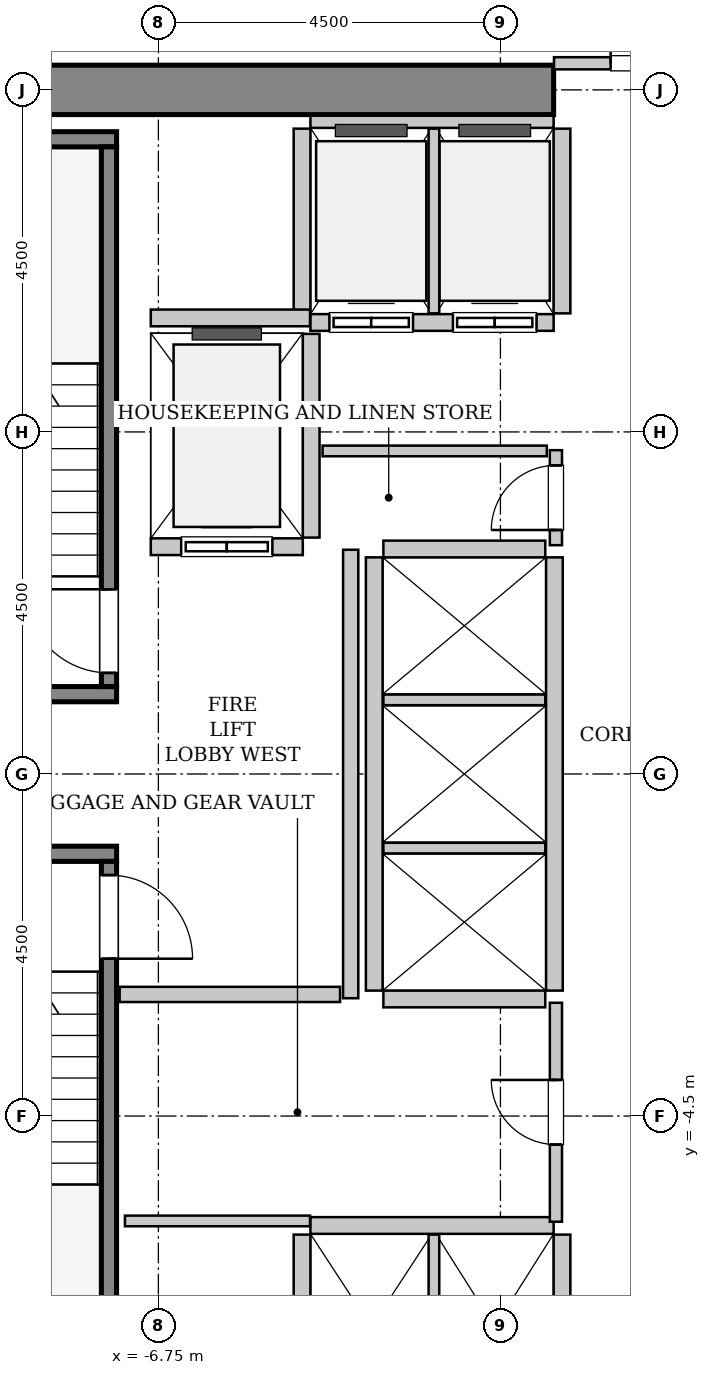
"""IFC4 building model, lengths in metres.
Left out: names, types, materials, properties, quantities, classifications, styles, units other than length and angle.
Written with IfcOpenShell. Run it as: python <this file> out.ifc"""

import sys

from ifc_helpers import new_model, si_unit, direction, frame, frame_2d, origin, place, context, subcontext, project, spatial, rectangle, extrude, source, transform, mapped, element, fill, save


model = new_model("IFC4")
c1 = context("Model", 3, precision=1e-05, world=origin(), true_north=direction((0.0, 1.0)))
c2 = subcontext(c1, "Body", "Model", "MODEL_VIEW")
j1 = project(units=[si_unit("LENGTHUNIT", "METRE"), si_unit("PLANEANGLEUNIT", "RADIAN")], contexts=[c1])
p1 = place(None, origin())
s1 = spatial("IfcSite", under=j1, at=p1, CompositionType="ELEMENT")
p2 = place(p1, origin())
s2 = spatial("IfcBuilding", under=s1, at=p2, CompositionType="ELEMENT")
p3 = place(p2, frame((0.0, 0.0, 48.2)))
s3 = spatial("IfcBuildingStorey", under=s2, at=p3, CompositionType="ELEMENT", Elevation=48.2)
m1 = source(origin(), c2, "Body", "SweptSolid", [
    extrude(rectangle(XDim=10.025, YDim=0.65, at=frame_2d((5.012, 0.0))), origin(), (0.0, 0.0, 1.0), 3.8),
])
p4 = place(p3, frame((-11.575, 9.0, 0.0), z_axis=(0.0, 0.0, 1.0), x_axis=(1.0, 0.0, 0.0)))
e1 = element("IfcWall", 1, at=p4, inside=s3, PredefinedType="SHEAR", context=c2, shape_type="MappedRepresentation", body=[
    mapped(m1, transform((0.0, 0.0, 0.0), x_axis=(1.0, 0.0, 0.0), y_axis=(0.0, 1.0, 0.0), z_axis=(0.0, 0.0, 1.0), scale=1.0)),
])
m2 = source(origin(), c2, "Body", "SweptSolid", [
    extrude(rectangle(XDim=3.4, YDim=0.2, at=frame_2d((1.7, 0.0))), origin(), (0.0, 0.0, 1.0), 3.8),
])
p5 = place(p3, frame((-7.3, 1.05, 0.0), z_axis=(0.0, 0.0, 1.0), x_axis=(-1.0, 0.0, 0.0)))
e2 = element("IfcWall", 2, at=p5, inside=s3, PredefinedType="SOLIDWALL", context=c2, shape_type="MappedRepresentation", body=[
    mapped(m2, transform((0.0, 0.0, 0.0), x_axis=(1.0, 0.0, 0.0), y_axis=(0.0, 1.0, 0.0), z_axis=(0.0, 0.0, 1.0), scale=1.0)),
])
m3 = source(origin(), c2, "Body", "SweptSolid", [
    extrude(rectangle(XDim=3.63, YDim=0.2, at=frame_2d((1.815, 0.0))), origin(), (0.0, 0.0, 1.0), 3.8),
])
p6 = place(p3, frame((-7.3, 8.35, 0.0), z_axis=(0.0, 0.0, 1.0), x_axis=(-1.0, 0.0, 0.0)))
e3 = element("IfcWall", 3, at=p6, inside=s3, PredefinedType="SOLIDWALL", context=c2, shape_type="MappedRepresentation", body=[
    mapped(m3, transform((0.0, 0.0, 0.0), x_axis=(1.0, 0.0, 0.0), y_axis=(0.0, 1.0, 0.0), z_axis=(0.0, 0.0, 1.0), scale=1.0)),
])
m4 = source(origin(), c2, "Body", "SweptSolid", [
    extrude(rectangle(XDim=7.1, YDim=0.2, at=frame_2d((3.55, 0.0))), origin(), (0.0, 0.0, 1.0), 3.8),
])
p7 = place(p3, frame((-7.4, 1.15, 0.0), z_axis=(0.0, 0.0, 1.0), x_axis=(0.0, 1.0, 0.0)))
e4 = element("IfcWall", 4, at=p7, inside=s3, PredefinedType="SOLIDWALL", context=c2, shape_type="MappedRepresentation", body=[
    mapped(m4, transform((0.0, 0.0, 0.0), x_axis=(1.0, 0.0, 0.0), y_axis=(0.0, 1.0, 0.0), z_axis=(0.0, 0.0, 1.0), scale=1.0)),
])
p8 = place(p7, frame((0.18, 0.0, 0.0)))
e5 = element("IfcOpeningElement", 5, at=p8, cuts=e4, PredefinedType="OPENING", context=c2, shape_type="SweptSolid", body=[
    extrude(rectangle(XDim=1.1, YDim=2.15, at=frame_2d((0.55, 1.075))), frame((0.0, 0.11, 0.0), z_axis=(0.0, -1.0, 0.0), x_axis=(1.0, 0.0, 0.0)), (0.0, 0.0, 1.0), 0.22),
])
p9 = place(p3, frame((-10.7, -1.05, 0.0), z_axis=(0.0, 0.0, 1.0), x_axis=(1.0, 0.0, 0.0)))
e6 = element("IfcWall", 6, at=p9, inside=s3, PredefinedType="SOLIDWALL", context=c2, shape_type="MappedRepresentation", body=[
    mapped(m2, transform((0.0, 0.0, 0.0), x_axis=(1.0, 0.0, 0.0), y_axis=(0.0, 1.0, 0.0), z_axis=(0.0, 0.0, 1.0), scale=1.0)),
])
p10 = place(p3, frame((-7.4, -1.15, 0.0), z_axis=(0.0, 0.0, 1.0), x_axis=(0.0, -1.0, 0.0)))
e7 = element("IfcWall", 7, at=p10, inside=s3, PredefinedType="SOLIDWALL", context=c2, shape_type="MappedRepresentation", body=[
    mapped(m4, transform((0.0, 0.0, 0.0), x_axis=(1.0, 0.0, 0.0), y_axis=(0.0, 1.0, 0.0), z_axis=(0.0, 0.0, 1.0), scale=1.0)),
])
p11 = place(p10, frame((0.18, 0.0, 0.0)))
e8 = element("IfcOpeningElement", 8, at=p11, cuts=e7, PredefinedType="OPENING", context=c2, shape_type="SweptSolid", body=[
    extrude(rectangle(XDim=1.1, YDim=2.15, at=frame_2d((0.55, 1.075))), frame((0.0, 0.11, 0.0), z_axis=(0.0, -1.0, 0.0), x_axis=(1.0, 0.0, 0.0)), (0.0, 0.0, 1.0), 0.22),
])
m5 = source(origin(), c2, "Body", "SweptSolid", [
    extrude(rectangle(XDim=2.0, YDim=0.22, at=frame_2d((1.0, 0.0))), origin(), (0.0, 0.0, 1.0), 3.535),
])
p12 = place(p3, frame((-6.85, 2.99, 0.0), z_axis=(0.0, 0.0, 1.0), x_axis=(1.0, 0.0, 0.0)))
e9 = element("IfcWall", 9, at=p12, inside=s3, PredefinedType="SOLIDWALL", context=c2, shape_type="MappedRepresentation", body=[
    mapped(m5, transform((0.0, 0.0, 0.0), x_axis=(1.0, 0.0, 0.0), y_axis=(0.0, 1.0, 0.0), z_axis=(0.0, 0.0, 1.0), scale=1.0)),
])
p13 = place(p12, frame((0.4, 0.0, 0.0)))
e10 = element("IfcOpeningElement", 10, at=p13, cuts=e9, PredefinedType="OPENING", context=c2, shape_type="SweptSolid", body=[
    extrude(rectangle(XDim=1.2, YDim=2.2, at=frame_2d((0.6, 1.1))), frame((0.0, 0.12, 0.0), z_axis=(0.0, -1.0, 0.0), x_axis=(1.0, 0.0, 0.0)), (0.0, 0.0, 1.0), 0.24),
])
m6 = source(origin(), c2, "Body", "SweptSolid", [
    extrude(rectangle(XDim=2.68, YDim=0.22, at=frame_2d((1.34, 0.0))), origin(), (0.0, 0.0, 1.0), 3.535),
])
p14 = place(p3, frame((-4.74, 3.11, 0.0), z_axis=(0.0, 0.0, 1.0), x_axis=(0.0, 1.0, 0.0)))
e11 = element("IfcWall", 11, at=p14, inside=s3, PredefinedType="SOLIDWALL", context=c2, shape_type="MappedRepresentation", body=[
    mapped(m6, transform((0.0, 0.0, 0.0), x_axis=(1.0, 0.0, 0.0), y_axis=(0.0, 1.0, 0.0), z_axis=(0.0, 0.0, 1.0), scale=1.0)),
])
m7 = source(origin(), c2, "Body", "SweptSolid", [
    extrude(rectangle(XDim=3.2, YDim=0.22, at=frame_2d((1.6, 0.0))), origin(), (0.0, 0.0, 1.0), 3.535),
])
p15 = place(p3, frame((-4.75, 5.94, 0.0), z_axis=(0.0, 0.0, 1.0), x_axis=(1.0, 0.0, 0.0)))
e12 = element("IfcWall", 12, at=p15, inside=s3, PredefinedType="SOLIDWALL", context=c2, shape_type="MappedRepresentation", body=[
    mapped(m7, transform((0.0, 0.0, 0.0), x_axis=(1.0, 0.0, 0.0), y_axis=(0.0, 1.0, 0.0), z_axis=(0.0, 0.0, 1.0), scale=1.0)),
])
p16 = place(p15, frame((0.25, 0.0, 0.0)))
e13 = element("IfcOpeningElement", 13, at=p16, cuts=e12, PredefinedType="OPENING", context=c2, shape_type="SweptSolid", body=[
    extrude(rectangle(XDim=1.1, YDim=2.2, at=frame_2d((0.55, 1.1))), frame((0.0, 0.12, 0.0), z_axis=(0.0, -1.0, 0.0), x_axis=(1.0, 0.0, 0.0)), (0.0, 0.0, 1.0), 0.24),
])
p17 = place(p15, frame((1.875, 0.0, 0.0)))
e14 = element("IfcOpeningElement", 14, at=p17, cuts=e12, PredefinedType="OPENING", context=c2, shape_type="SweptSolid", body=[
    extrude(rectangle(XDim=1.1, YDim=2.2, at=frame_2d((0.55, 1.1))), frame((0.0, 0.12, 0.0), z_axis=(0.0, -1.0, 0.0), x_axis=(1.0, 0.0, 0.0)), (0.0, 0.0, 1.0), 0.24),
])
m8 = source(origin(), c2, "Body", "SweptSolid", [
    extrude(rectangle(XDim=3.2, YDim=0.16, at=frame_2d((1.6, 0.0))), origin(), (0.0, 0.0, 1.0), 2.425),
])
p18 = place(p3, frame((-1.55, 8.58, 0.0), z_axis=(0.0, 0.0, 1.0), x_axis=(-1.0, 0.0, 0.0)))
e15 = element("IfcWall", 15, at=p18, inside=s3, PredefinedType="PARTITIONING", context=c2, shape_type="MappedRepresentation", body=[
    mapped(m8, transform((0.0, 0.0, 0.0), x_axis=(1.0, 0.0, 0.0), y_axis=(0.0, 1.0, 0.0), z_axis=(0.0, 0.0, 1.0), scale=1.0)),
])
m9 = source(origin(), c2, "Body", "SweptSolid", [
    extrude(rectangle(XDim=2.43, YDim=0.22, at=frame_2d((1.215, 0.0))), origin(), (0.0, 0.0, 1.0), 3.535),
])
p19 = place(p3, frame((-4.86, 8.49, 0.0), z_axis=(0.0, 0.0, 1.0), x_axis=(0.0, -1.0, 0.0)))
e16 = element("IfcWall", 16, at=p19, inside=s3, PredefinedType="SOLIDWALL", context=c2, shape_type="MappedRepresentation", body=[
    mapped(m9, transform((0.0, 0.0, 0.0), x_axis=(1.0, 0.0, 0.0), y_axis=(0.0, 1.0, 0.0), z_axis=(0.0, 0.0, 1.0), scale=1.0)),
])
m10 = source(origin(), c2, "Body", "SweptSolid", [
    extrude(rectangle(XDim=2.43, YDim=0.14, at=frame_2d((1.215, 0.0))), origin(), (0.0, 0.0, 1.0), 3.535),
])
p20 = place(p3, frame((-3.125, 6.06, 0.0), z_axis=(0.0, 0.0, 1.0), x_axis=(0.0, 1.0, 0.0)))
e17 = element("IfcWall", 17, at=p20, inside=s3, PredefinedType="PARTITIONING", context=c2, shape_type="MappedRepresentation", body=[
    mapped(m10, transform((0.0, 0.0, 0.0), x_axis=(1.0, 0.0, 0.0), y_axis=(0.0, 1.0, 0.0), z_axis=(0.0, 0.0, 1.0), scale=1.0)),
])
p21 = place(p3, frame((-1.44, 6.06, 0.0), z_axis=(0.0, 0.0, 1.0), x_axis=(0.0, 1.0, 0.0)))
e18 = element("IfcWall", 18, at=p21, inside=s3, PredefinedType="SOLIDWALL", context=c2, shape_type="MappedRepresentation", body=[
    mapped(m9, transform((0.0, 0.0, 0.0), x_axis=(1.0, 0.0, 0.0), y_axis=(0.0, 1.0, 0.0), z_axis=(0.0, 0.0, 1.0), scale=1.0)),
])
p22 = place(p3, frame((-1.55, -5.94, 0.0), z_axis=(0.0, 0.0, 1.0), x_axis=(-1.0, 0.0, 0.0)))
e19 = element("IfcWall", 19, at=p22, inside=s3, PredefinedType="SOLIDWALL", context=c2, shape_type="MappedRepresentation", body=[
    mapped(m7, transform((0.0, 0.0, 0.0), x_axis=(1.0, 0.0, 0.0), y_axis=(0.0, 1.0, 0.0), z_axis=(0.0, 0.0, 1.0), scale=1.0)),
])
p23 = place(p3, frame((-4.86, -6.06, 0.0), z_axis=(0.0, 0.0, 1.0), x_axis=(0.0, -1.0, 0.0)))
e20 = element("IfcWall", 20, at=p23, inside=s3, PredefinedType="SOLIDWALL", context=c2, shape_type="MappedRepresentation", body=[
    mapped(m9, transform((0.0, 0.0, 0.0), x_axis=(1.0, 0.0, 0.0), y_axis=(0.0, 1.0, 0.0), z_axis=(0.0, 0.0, 1.0), scale=1.0)),
])
p24 = place(p3, frame((-3.125, -8.49, 0.0), z_axis=(0.0, 0.0, 1.0), x_axis=(0.0, 1.0, 0.0)))
e21 = element("IfcWall", 21, at=p24, inside=s3, PredefinedType="PARTITIONING", context=c2, shape_type="MappedRepresentation", body=[
    mapped(m10, transform((0.0, 0.0, 0.0), x_axis=(1.0, 0.0, 0.0), y_axis=(0.0, 1.0, 0.0), z_axis=(0.0, 0.0, 1.0), scale=1.0)),
])
p25 = place(p3, frame((-1.44, -8.49, 0.0), z_axis=(0.0, 0.0, 1.0), x_axis=(0.0, 1.0, 0.0)))
e22 = element("IfcWall", 22, at=p25, inside=s3, PredefinedType="SOLIDWALL", context=c2, shape_type="MappedRepresentation", body=[
    mapped(m9, transform((0.0, 0.0, 0.0), x_axis=(1.0, 0.0, 0.0), y_axis=(0.0, 1.0, 0.0), z_axis=(0.0, 0.0, 1.0), scale=1.0)),
])
m11 = source(origin(), c2, "Body", "SweptSolid", [
    extrude(rectangle(XDim=5.7, YDim=0.22, at=frame_2d((2.85, 0.0))), origin(), (0.0, 0.0, 1.0), 3.535),
])
for number, where, z_axis, x_axis in (
    (23, (-1.54, -2.85, 0.0), (0.0, 0.0, 1.0), (0.0, 1.0, 0.0)),
    (24, (-3.91, 2.85, 0.0), (0.0, 0.0, 1.0), (0.0, -1.0, 0.0)),
):
    element("IfcWall", number, at=place(p3, frame(where, z_axis=z_axis, x_axis=x_axis)), inside=s3, PredefinedType="SOLIDWALL", context=c2, shape_type="MappedRepresentation", body=[
        mapped(m11, transform((0.0, 0.0, 0.0), x_axis=(1.0, 0.0, 0.0), y_axis=(0.0, 1.0, 0.0), z_axis=(0.0, 0.0, 1.0), scale=1.0)),
    ])
m12 = source(origin(), c2, "Body", "SweptSolid", [
    extrude(rectangle(XDim=2.13, YDim=0.22, at=frame_2d((1.065, 0.0))), origin(), (0.0, 0.0, 1.0), 3.535),
])
p26 = place(p3, frame((-3.79, -2.96, 0.0), z_axis=(0.0, 0.0, 1.0), x_axis=(1.0, 0.0, 0.0)))
e25 = element("IfcWall", 25, at=p26, inside=s3, PredefinedType="SOLIDWALL", context=c2, shape_type="MappedRepresentation", body=[
    mapped(m12, transform((0.0, 0.0, 0.0), x_axis=(1.0, 0.0, 0.0), y_axis=(0.0, 1.0, 0.0), z_axis=(0.0, 0.0, 1.0), scale=1.0)),
])
m13 = source(origin(), c2, "Body", "SweptSolid", [
    extrude(rectangle(XDim=2.13, YDim=0.14, at=frame_2d((1.065, 0.0))), origin(), (0.0, 0.0, 1.0), 3.535),
])
for number, where, z_axis, x_axis in (
    (26, (-3.79, -0.975, 0.0), (0.0, 0.0, 1.0), (1.0, 0.0, 0.0)),
    (27, (-3.79, 0.975, 0.0), (0.0, 0.0, 1.0), (1.0, 0.0, 0.0)),
):
    element("IfcWall", number, at=place(p3, frame(where, z_axis=z_axis, x_axis=x_axis)), inside=s3, PredefinedType="PARTITIONING", context=c2, shape_type="MappedRepresentation", body=[
        mapped(m13, transform((0.0, 0.0, 0.0), x_axis=(1.0, 0.0, 0.0), y_axis=(0.0, 1.0, 0.0), z_axis=(0.0, 0.0, 1.0), scale=1.0)),
    ])
p27 = place(p3, frame((-1.66, 2.96, 0.0), z_axis=(0.0, 0.0, 1.0), x_axis=(-1.0, 0.0, 0.0)))
e28 = element("IfcWall", 28, at=p27, inside=s3, PredefinedType="SOLIDWALL", context=c2, shape_type="MappedRepresentation", body=[
    mapped(m12, transform((0.0, 0.0, 0.0), x_axis=(1.0, 0.0, 0.0), y_axis=(0.0, 1.0, 0.0), z_axis=(0.0, 0.0, 1.0), scale=1.0)),
])
m14 = source(origin(), c2, "Body", "SweptSolid", [
    extrude(rectangle(XDim=2.095, YDim=0.22, at=frame_2d((1.048, 0.0))), origin(), (0.0, 0.0, 1.0), 3.535),
])
p28 = place(p3, frame((-6.85, 6.0, 0.0), z_axis=(0.0, 0.0, 1.0), x_axis=(1.0, 0.0, 0.0)))
e29 = element("IfcWall", 29, at=p28, inside=s3, PredefinedType="SOLIDWALL", context=c2, shape_type="MappedRepresentation", body=[
    mapped(m14, transform((0.0, 0.0, 0.0), x_axis=(1.0, 0.0, 0.0), y_axis=(0.0, 1.0, 0.0), z_axis=(0.0, 0.0, 1.0), scale=1.0)),
])
m15 = source(origin(), c2, "Body", "SweptSolid", [
    extrude(rectangle(XDim=5.9, YDim=0.2, at=frame_2d((2.95, 0.0))), origin(), (0.0, 0.0, 1.0), 3.535),
])
p29 = place(p3, frame((-4.22, -2.95, 0.0), z_axis=(0.0, 0.0, 1.0), x_axis=(0.0, 1.0, 0.0)))
e30 = element("IfcWall", 30, at=p29, inside=s3, PredefinedType="PARTITIONING", context=c2, shape_type="MappedRepresentation", body=[
    mapped(m15, transform((0.0, 0.0, 0.0), x_axis=(1.0, 0.0, 0.0), y_axis=(0.0, 1.0, 0.0), z_axis=(0.0, 0.0, 1.0), scale=1.0)),
])
m16 = source(origin(), c2, "Body", "SweptSolid", [
    extrude(rectangle(XDim=2.9, YDim=0.2, at=frame_2d((1.45, 0.0))), origin(), (0.0, 0.0, 1.0), 3.535),
])
p30 = place(p3, frame((-7.26, -2.9, 0.0), z_axis=(0.0, 0.0, 1.0), x_axis=(1.0, 0.0, 0.0)))
e31 = element("IfcWall", 31, at=p30, inside=s3, PredefinedType="PARTITIONING", context=c2, shape_type="MappedRepresentation", body=[
    mapped(m16, transform((0.0, 0.0, 0.0), x_axis=(1.0, 0.0, 0.0), y_axis=(0.0, 1.0, 0.0), z_axis=(0.0, 0.0, 1.0), scale=1.0)),
])
m17 = source(origin(), c2, "Body", "SweptSolid", [
    extrude(rectangle(XDim=3.09, YDim=0.16, at=frame_2d((1.545, 0.0))), origin(), (0.0, 0.0, 1.0), 2.425),
])
p31 = place(p3, frame((-1.545, 9.35, 0.0), z_axis=(0.0, 0.0, 1.0), x_axis=(1.0, 0.0, 0.0)))
e32 = element("IfcWall", 32, at=p31, inside=s3, PredefinedType="PARTITIONING", context=c2, shape_type="MappedRepresentation", body=[
    mapped(m17, transform((0.0, 0.0, 0.0), x_axis=(1.0, 0.0, 0.0), y_axis=(0.0, 1.0, 0.0), z_axis=(0.0, 0.0, 1.0), scale=1.0)),
])
p32 = place(p31, frame((0.745, 0.0, 0.0)))
e33 = element("IfcOpeningElement", 33, at=p32, cuts=e32, PredefinedType="OPENING", context=c2, shape_type="SweptSolid", body=[
    extrude(rectangle(XDim=1.6, YDim=2.3, at=frame_2d((0.8, 1.15))), frame((0.0, 0.09, 0.0), z_axis=(0.0, -1.0, 0.0), x_axis=(1.0, 0.0, 0.0)), (0.0, 0.0, 1.0), 0.18),
])
m18 = source(origin(), c2, "Body", "SweptSolid", [
    extrude(rectangle(XDim=1.25, YDim=0.16, at=frame_2d((0.625, 0.0))), origin(), (0.0, 0.0, 1.0), 3.535),
])
p33 = place(p3, frame((-1.52, 3.01, 0.0), z_axis=(0.0, 0.0, 1.0), x_axis=(0.0, 1.0, 0.0)))
e34 = element("IfcWall", 34, at=p33, inside=s3, PredefinedType="PARTITIONING", context=c2, shape_type="MappedRepresentation", body=[
    mapped(m18, transform((0.0, 0.0, 0.0), x_axis=(1.0, 0.0, 0.0), y_axis=(0.0, 1.0, 0.0), z_axis=(0.0, 0.0, 1.0), scale=1.0)),
])
p34 = place(p33, frame((0.2, 0.0, 0.0)))
e35 = element("IfcOpeningElement", 35, at=p34, cuts=e34, PredefinedType="OPENING", context=c2, shape_type="SweptSolid", body=[
    extrude(rectangle(XDim=0.85, YDim=2.1, at=frame_2d((0.425, 1.05))), frame((0.0, 0.09, 0.0), z_axis=(0.0, -1.0, 0.0), x_axis=(1.0, 0.0, 0.0)), (0.0, 0.0, 1.0), 0.18),
])
m19 = source(origin(), c2, "Body", "SweptSolid", [
    extrude(rectangle(XDim=2.95, YDim=0.14, at=frame_2d((1.475, 0.0))), origin(), (0.0, 0.0, 1.0), 3.535),
])
p35 = place(p3, frame((-4.59, 4.25, 0.0), z_axis=(0.0, 0.0, 1.0), x_axis=(1.0, 0.0, 0.0)))
e36 = element("IfcWall", 36, at=p35, inside=s3, PredefinedType="PARTITIONING", context=c2, shape_type="MappedRepresentation", body=[
    mapped(m19, transform((0.0, 0.0, 0.0), x_axis=(1.0, 0.0, 0.0), y_axis=(0.0, 1.0, 0.0), z_axis=(0.0, 0.0, 1.0), scale=1.0)),
])
m20 = source(origin(), c2, "Body", "SweptSolid", [
    extrude(rectangle(XDim=2.88, YDim=0.16, at=frame_2d((1.44, 0.0))), origin(), (0.0, 0.0, 1.0), 3.535),
])
p36 = place(p3, frame((-1.52, -5.89, 0.0), z_axis=(0.0, 0.0, 1.0), x_axis=(0.0, 1.0, 0.0)))
e37 = element("IfcWall", 37, at=p36, inside=s3, PredefinedType="PARTITIONING", context=c2, shape_type="MappedRepresentation", body=[
    mapped(m20, transform((0.0, 0.0, 0.0), x_axis=(1.0, 0.0, 0.0), y_axis=(0.0, 1.0, 0.0), z_axis=(0.0, 0.0, 1.0), scale=1.0)),
])
p37 = place(p36, frame((1.015, 0.0, 0.0)))
e38 = element("IfcOpeningElement", 38, at=p37, cuts=e37, PredefinedType="OPENING", context=c2, shape_type="SweptSolid", body=[
    extrude(rectangle(XDim=0.85, YDim=2.1, at=frame_2d((0.425, 1.05))), frame((0.0, 0.09, 0.0), z_axis=(0.0, -1.0, 0.0), x_axis=(1.0, 0.0, 0.0)), (0.0, 0.0, 1.0), 0.18),
])
m21 = source(origin(), c2, "Body", "SweptSolid", [
    extrude(rectangle(XDim=2.435, YDim=0.14, at=frame_2d((1.218, 0.0))), origin(), (0.0, 0.0, 1.0), 3.535),
])
p38 = place(p3, frame((-7.19, -5.88, 0.0), z_axis=(0.0, 0.0, 1.0), x_axis=(1.0, 0.0, 0.0)))
e39 = element("IfcWall", 39, at=p38, inside=s3, PredefinedType="PARTITIONING", context=c2, shape_type="MappedRepresentation", body=[
    mapped(m21, transform((0.0, 0.0, 0.0), x_axis=(1.0, 0.0, 0.0), y_axis=(0.0, 1.0, 0.0), z_axis=(0.0, 0.0, 1.0), scale=1.0)),
])
m22 = source(origin(), c2, "Body", "SweptSolid", [
    extrude(rectangle(XDim=1.1, YDim=2.15, at=frame_2d((0.55, 1.075))), frame((0.0, 0.025, 0.0), z_axis=(0.0, -1.0, 0.0), x_axis=(1.0, 0.0, 0.0)), (0.0, 0.0, 1.0), 0.05),
])
p39 = place(p8, origin())
e40 = element("IfcDoor", 40, at=p39, inside=s3, OperationType="SINGLE_SWING_RIGHT", PredefinedType="DOOR", context=c2, shape_type="MappedRepresentation", body=[
    mapped(m22, transform((0.0, 0.0, 0.0), x_axis=(1.0, 0.0, 0.0), y_axis=(0.0, 1.0, 0.0), z_axis=(0.0, 0.0, 1.0), scale=1.0)),
])
fill(e5, e40)
p40 = place(p11, origin())
e41 = element("IfcDoor", 41, at=p40, inside=s3, OperationType="SINGLE_SWING_RIGHT", PredefinedType="DOOR", context=c2, shape_type="MappedRepresentation", body=[
    mapped(m22, transform((0.0, 0.0, 0.0), x_axis=(1.0, 0.0, 0.0), y_axis=(0.0, 1.0, 0.0), z_axis=(0.0, 0.0, 1.0), scale=1.0)),
])
fill(e8, e41)
m23 = source(origin(), c2, "Body", "SweptSolid", [
    extrude(rectangle(XDim=1.2, YDim=2.2, at=frame_2d((0.6, 1.1))), frame((0.0, 0.025, 0.0), z_axis=(0.0, -1.0, 0.0), x_axis=(1.0, 0.0, 0.0)), (0.0, 0.0, 1.0), 0.05),
])
p41 = place(p13, origin())
e42 = element("IfcDoor", 42, at=p41, inside=s3, OperationType="SLIDING_TO_LEFT", PredefinedType="DOOR", context=c2, shape_type="MappedRepresentation", body=[
    mapped(m23, transform((0.0, 0.0, 0.0), x_axis=(1.0, 0.0, 0.0), y_axis=(0.0, 1.0, 0.0), z_axis=(0.0, 0.0, 1.0), scale=1.0)),
])
fill(e10, e42)
m24 = source(origin(), c2, "Body", "SweptSolid", [
    extrude(rectangle(XDim=1.1, YDim=2.2, at=frame_2d((0.55, 1.1))), frame((0.0, 0.025, 0.0), z_axis=(0.0, -1.0, 0.0), x_axis=(1.0, 0.0, 0.0)), (0.0, 0.0, 1.0), 0.05),
])
p42 = place(p16, origin())
e43 = element("IfcDoor", 43, at=p42, inside=s3, OperationType="DOUBLE_DOOR_SLIDING", PredefinedType="DOOR", context=c2, shape_type="MappedRepresentation", body=[
    mapped(m24, transform((0.0, 0.0, 0.0), x_axis=(1.0, 0.0, 0.0), y_axis=(0.0, 1.0, 0.0), z_axis=(0.0, 0.0, 1.0), scale=1.0)),
])
fill(e13, e43)
p43 = place(p17, origin())
e44 = element("IfcDoor", 44, at=p43, inside=s3, OperationType="DOUBLE_DOOR_SLIDING", PredefinedType="DOOR", context=c2, shape_type="MappedRepresentation", body=[
    mapped(m24, transform((0.0, 0.0, 0.0), x_axis=(1.0, 0.0, 0.0), y_axis=(0.0, 1.0, 0.0), z_axis=(0.0, 0.0, 1.0), scale=1.0)),
])
fill(e14, e44)
m25 = source(origin(), c2, "Body", "SweptSolid", [
    extrude(rectangle(XDim=1.6, YDim=2.3, at=frame_2d((0.8, 1.15))), frame((0.0, 0.025, 0.0), z_axis=(0.0, -1.0, 0.0), x_axis=(1.0, 0.0, 0.0)), (0.0, 0.0, 1.0), 0.05),
])
p44 = place(p32, origin())
e45 = element("IfcDoor", 45, at=p44, inside=s3, OperationType="DOUBLE_DOOR_SINGLE_SWING", PredefinedType="DOOR", context=c2, shape_type="MappedRepresentation", body=[
    mapped(m25, transform((0.0, 0.0, 0.0), x_axis=(1.0, 0.0, 0.0), y_axis=(0.0, 1.0, 0.0), z_axis=(0.0, 0.0, 1.0), scale=1.0)),
])
fill(e33, e45)
m26 = source(origin(), c2, "Body", "SweptSolid", [
    extrude(rectangle(XDim=0.85, YDim=2.1, at=frame_2d((0.425, 1.05))), frame((0.0, 0.025, 0.0), z_axis=(0.0, -1.0, 0.0), x_axis=(1.0, 0.0, 0.0)), (0.0, 0.0, 1.0), 0.05),
])
p45 = place(p34, origin())
e46 = element("IfcDoor", 46, at=p45, inside=s3, OperationType="SINGLE_SWING_LEFT", PredefinedType="DOOR", context=c2, shape_type="MappedRepresentation", body=[
    mapped(m26, transform((0.0, 0.0, 0.0), x_axis=(1.0, 0.0, 0.0), y_axis=(0.0, 1.0, 0.0), z_axis=(0.0, 0.0, 1.0), scale=1.0)),
])
fill(e35, e46)
p46 = place(p37, origin())
e47 = element("IfcDoor", 47, at=p46, inside=s3, OperationType="SINGLE_SWING_RIGHT", PredefinedType="DOOR", context=c2, shape_type="MappedRepresentation", body=[
    mapped(m26, transform((0.0, 0.0, 0.0), x_axis=(1.0, 0.0, 0.0), y_axis=(0.0, 1.0, 0.0), z_axis=(0.0, 0.0, 1.0), scale=1.0)),
])
fill(e38, e47)
save(model, sys.argv[1])
